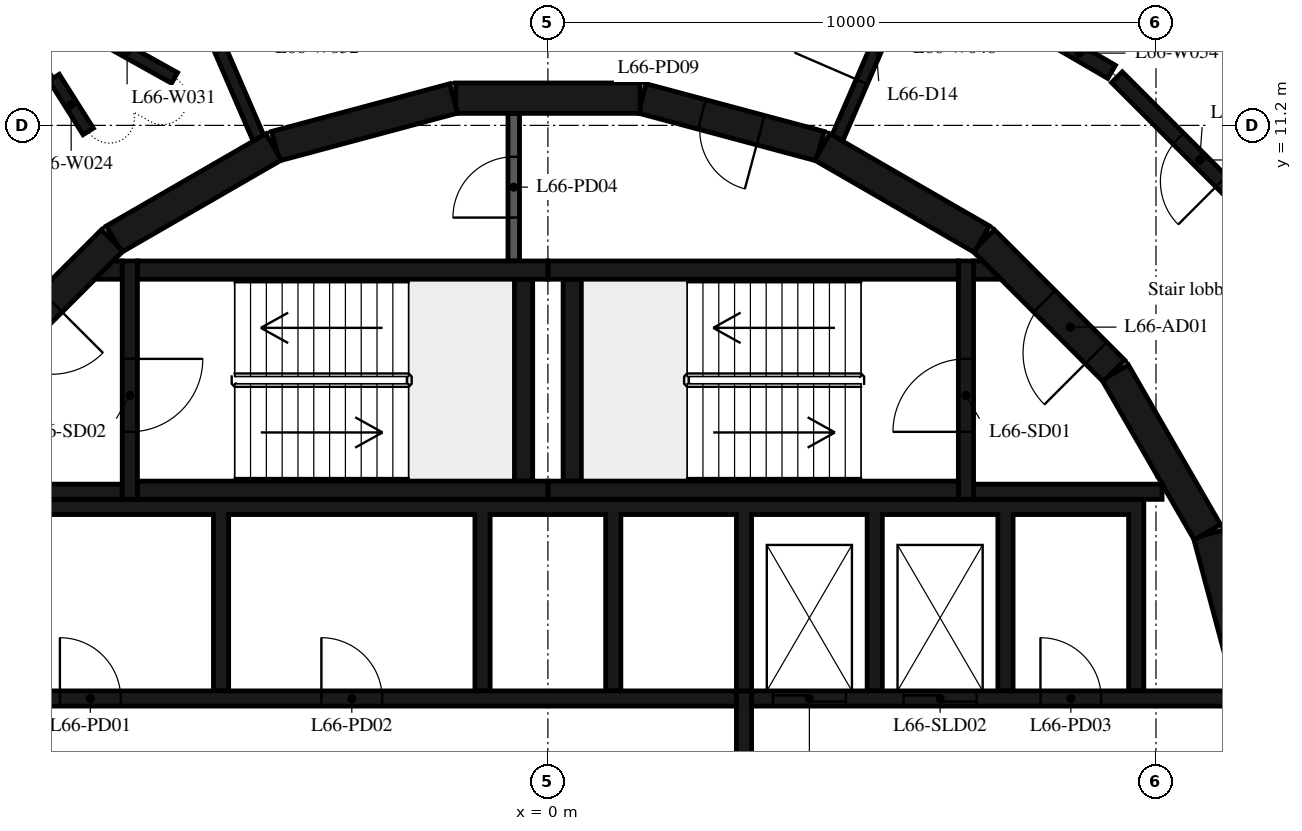
"""IFC4 building model, lengths in metres.
Left out: names, types, materials, properties, quantities, classifications, styles, units other than length and angle.
Written with IfcOpenShell. Run it as: python <this file> out.ifc"""

import sys

from ifc_helpers import new_model, si_unit, direction, frame, frame_2d, origin, place, context, subcontext, project, spatial, polyline, rectangle, outline, extrude, element, fill, save


model = new_model("IFC4")
c1 = context("Model", 3, precision=1e-05, world=origin(), true_north=direction((0.0, 1.0)))
c2 = subcontext(c1, "Body", "Model", "MODEL_VIEW")
j1 = project(units=[si_unit("LENGTHUNIT", "METRE"), si_unit("PLANEANGLEUNIT", "RADIAN")], contexts=[c1])
p1 = place(None, origin())
s1 = spatial("IfcSite", under=j1, at=p1, CompositionType="ELEMENT")
p2 = place(p1, origin())
s2 = spatial("IfcBuilding", under=s1, at=p2, CompositionType="ELEMENT")
p3 = place(p2, frame((0.0, 0.0, 258.2)))
s3 = spatial("IfcBuildingStorey", under=s2, at=p3, CompositionType="ELEMENT", Elevation=258.2)
for number, where, z_axis, x_axis in (
    (1, (11.643, 1.55, 0.0), (0.0, 0.0, 1.0), (-0.259, 0.966, 0.0)),
    (2, (10.845, 4.51, 0.0), (0.0, 0.0, 1.0), (-0.5, 0.866, 0.0)),
):
    element("IfcWall", number, at=place(p3, frame(where, z_axis=z_axis, x_axis=x_axis)), inside=s3, PredefinedType="SHEAR", context=c2, shape_type="SweptSolid", body=[
        extrude(rectangle(XDim=3.033, YDim=0.5, at=frame_2d((1.516, 0.0))), origin(), (0.0, 0.0, 1.0), 4.75),
    ])
p4 = place(p3, frame((9.308, 7.164, 0.0), z_axis=(0.0, 0.0, 1.0), x_axis=(-0.707106781187, 0.707106781187, 0.0)))
e3 = element("IfcWall", 3, at=p4, inside=s3, PredefinedType="SHEAR", context=c2, shape_type="SweptSolid", body=[
    extrude(rectangle(XDim=3.032, YDim=0.5, at=frame_2d((1.516, 0.0))), origin(), (0.0, 0.0, 1.0), 4.75),
])
p5 = place(p4, frame((0.416, 0.0, 0.0)))
e4 = element("IfcOpeningElement", 4, at=p5, cuts=e3, PredefinedType="OPENING", context=c2, shape_type="SweptSolid", body=[
    extrude(rectangle(XDim=1.2, YDim=2.1, at=frame_2d((0.6, 1.05))), frame((0.0, 0.26, 0.0), z_axis=(0.0, -1.0, 0.0), x_axis=(1.0, 0.0, 0.0)), (0.0, 0.0, 1.0), 0.52),
])
p6 = place(p3, frame((7.137, 9.329, 0.0), z_axis=(0.0, 0.0, 1.0), x_axis=(-0.865975092491, 0.500087131594, 0.0)))
e5 = element("IfcWall", 5, at=p6, inside=s3, PredefinedType="SHEAR", context=c2, shape_type="SweptSolid", body=[
    extrude(rectangle(XDim=3.033, YDim=0.5, at=frame_2d((1.516, 0.0))), origin(), (0.0, 0.0, 1.0), 4.75),
])
p7 = place(p3, frame((4.479, 10.858, 0.0), z_axis=(0.0, 0.0, 1.0), x_axis=(-0.965948410781, 0.258734743916, 0.0)))
e6 = element("IfcWall", 6, at=p7, inside=s3, PredefinedType="SHEAR", context=c2, shape_type="SweptSolid", body=[
    extrude(rectangle(XDim=3.033, YDim=0.5, at=frame_2d((1.516, 0.0))), origin(), (0.0, 0.0, 1.0), 4.75),
])
p8 = place(p7, frame((1.016, 0.0, 0.0)))
e7 = element("IfcOpeningElement", 7, at=p8, cuts=e6, PredefinedType="OPENING", context=c2, shape_type="SweptSolid", body=[
    extrude(rectangle(XDim=1.0, YDim=2.4, at=frame_2d((0.5, 1.2))), frame((0.0, 0.26, 0.0), z_axis=(0.0, -1.0, 0.0), x_axis=(1.0, 0.0, 0.0)), (0.0, 0.0, 1.0), 0.52),
])
for number, where, z_axis, x_axis in (
    (8, (1.516, 11.647, 0.0), (0.0, 0.0, 1.0), (-1.0, 0.0, 0.0)),
    (9, (-1.55, 11.643, 0.0), (0.0, 0.0, 1.0), (-0.966, -0.259, 0.0)),
    (10, (-4.51, 10.845, 0.0), (0.0, 0.0, 1.0), (-0.866, -0.5, 0.0)),
):
    element("IfcWall", number, at=place(p3, frame(where, z_axis=z_axis, x_axis=x_axis)), inside=s3, PredefinedType="SHEAR", context=c2, shape_type="SweptSolid", body=[
        extrude(rectangle(XDim=3.033, YDim=0.5, at=frame_2d((1.516, 0.0))), origin(), (0.0, 0.0, 1.0), 4.75),
    ])
p9 = place(p3, frame((-7.164, 9.308, 0.0), z_axis=(0.0, 0.0, 1.0), x_axis=(-0.707106781187, -0.707106781187, 0.0)))
e11 = element("IfcWall", 11, at=p9, inside=s3, PredefinedType="SHEAR", context=c2, shape_type="SweptSolid", body=[
    extrude(rectangle(XDim=3.032, YDim=0.5, at=frame_2d((1.516, 0.0))), origin(), (0.0, 0.0, 1.0), 4.75),
])
p10 = place(p9, frame((1.416, 0.0, 0.0)))
e12 = element("IfcOpeningElement", 12, at=p10, cuts=e11, PredefinedType="OPENING", context=c2, shape_type="SweptSolid", body=[
    extrude(rectangle(XDim=1.2, YDim=2.1, at=frame_2d((0.6, 1.05))), frame((0.0, 0.26, 0.0), z_axis=(0.0, -1.0, 0.0), x_axis=(1.0, 0.0, 0.0)), (0.0, 0.0, 1.0), 0.52),
])
for number, where, z_axis, x_axis in (
    (13, (0.0, 5.2, 0.0), (0.0, 0.0, 1.0), (1.0, 0.0, 0.0)),
    (14, (0.0, 8.82, 0.0), (0.0, 0.0, 1.0), (1.0, 0.0, 0.0)),
):
    element("IfcWall", number, at=place(p3, frame(where, z_axis=z_axis, x_axis=x_axis)), inside=s3, PredefinedType="SHEAR", context=c2, shape_type="SweptSolid", body=[
        extrude(rectangle(XDim=6.75, YDim=0.3, at=frame_2d((3.375, 0.0))), origin(), (0.0, 0.0, 1.0), 4.75),
    ])
p11 = place(p3, frame((0.4, 5.35, 0.0), z_axis=(0.0, 0.0, 1.0), x_axis=(0.0, 1.0, 0.0)))
e15 = element("IfcWall", 15, at=p11, inside=s3, PredefinedType="SHEAR", context=c2, shape_type="SweptSolid", body=[
    extrude(rectangle(XDim=3.32, YDim=0.3, at=frame_2d((1.66, 0.0))), origin(), (0.0, 0.0, 1.0), 4.75),
])
p12 = place(p3, frame((6.875, 5.05, 0.0), z_axis=(0.0, 0.0, 1.0), x_axis=(0.0, 1.0, 0.0)))
e16 = element("IfcWall", 16, at=p12, inside=s3, PredefinedType="SHEAR", context=c2, shape_type="SweptSolid", body=[
    extrude(rectangle(XDim=3.92, YDim=0.25, at=frame_2d((1.96, 0.0))), origin(), (0.0, 0.0, 1.0), 4.75),
])
p13 = place(p12, frame((1.11, 0.0, 0.0)))
e17 = element("IfcOpeningElement", 17, at=p13, cuts=e16, PredefinedType="OPENING", context=c2, shape_type="SweptSolid", body=[
    extrude(rectangle(XDim=1.2, YDim=2.1, at=frame_2d((0.6, 1.05))), frame((0.0, 0.135, 0.0), z_axis=(0.0, -1.0, 0.0), x_axis=(1.0, 0.0, 0.0)), (0.0, 0.0, 1.0), 0.27),
])
p14 = place(p3, frame((7.0, 5.175, 0.0), z_axis=(0.0, 0.0, 1.0), x_axis=(1.0, 0.0, 0.0)))
e18 = element("IfcWall", 18, at=p14, inside=s3, PredefinedType="SHEAR", context=c2, shape_type="SweptSolid", body=[
    extrude(rectangle(XDim=3.1, YDim=0.25, at=frame_2d((1.55, 0.0))), origin(), (0.0, 0.0, 1.0), 4.75),
])
p15 = place(p3, origin())
e19 = element("IfcWall", 19, at=p15, inside=s3, PredefinedType="SHEAR", context=c2, shape_type="SweptSolid", body=[
    extrude(outline(polyline([(7.448, 8.67), (7.0, 8.67), (7.0, 8.97), (7.148, 8.97), (7.448, 8.67)])), origin(), (0.0, 0.0, 1.0), 4.75),
])
for number, where, z_axis, x_axis in (
    (20, (-6.75, 5.2, 0.0), (0.0, 0.0, 1.0), (1.0, 0.0, 0.0)),
    (21, (-6.75, 8.82, 0.0), (0.0, 0.0, 1.0), (1.0, 0.0, 0.0)),
):
    element("IfcWall", number, at=place(p3, frame(where, z_axis=z_axis, x_axis=x_axis)), inside=s3, PredefinedType="SHEAR", context=c2, shape_type="SweptSolid", body=[
        extrude(rectangle(XDim=6.75, YDim=0.3, at=frame_2d((3.375, 0.0))), origin(), (0.0, 0.0, 1.0), 4.75),
    ])
p16 = place(p3, frame((-0.4, 5.35, 0.0), z_axis=(0.0, 0.0, 1.0), x_axis=(0.0, 1.0, 0.0)))
e22 = element("IfcWall", 22, at=p16, inside=s3, PredefinedType="SHEAR", context=c2, shape_type="SweptSolid", body=[
    extrude(rectangle(XDim=3.32, YDim=0.3, at=frame_2d((1.66, 0.0))), origin(), (0.0, 0.0, 1.0), 4.75),
])
p17 = place(p3, frame((-6.875, 8.97, 0.0), z_axis=(0.0, 0.0, 1.0), x_axis=(0.0, -1.0, 0.0)))
e23 = element("IfcWall", 23, at=p17, inside=s3, PredefinedType="SHEAR", context=c2, shape_type="SweptSolid", body=[
    extrude(rectangle(XDim=3.92, YDim=0.25, at=frame_2d((1.96, 0.0))), origin(), (0.0, 0.0, 1.0), 4.75),
])
p18 = place(p17, frame((1.61, 0.0, 0.0)))
e24 = element("IfcOpeningElement", 24, at=p18, cuts=e23, PredefinedType="OPENING", context=c2, shape_type="SweptSolid", body=[
    extrude(rectangle(XDim=1.2, YDim=2.1, at=frame_2d((0.6, 1.05))), frame((0.0, 0.135, 0.0), z_axis=(0.0, -1.0, 0.0), x_axis=(1.0, 0.0, 0.0)), (0.0, 0.0, 1.0), 0.27),
])
p19 = place(p3, frame((-7.0, 5.175, 0.0), z_axis=(0.0, 0.0, 1.0), x_axis=(-1.0, 0.0, 0.0)))
e25 = element("IfcWall", 25, at=p19, inside=s3, PredefinedType="SHEAR", context=c2, shape_type="SweptSolid", body=[
    extrude(rectangle(XDim=3.1, YDim=0.25, at=frame_2d((1.55, 0.0))), origin(), (0.0, 0.0, 1.0), 4.75),
])
p20 = place(p3, origin())
e26 = element("IfcWall", 26, at=p20, inside=s3, PredefinedType="SHEAR", context=c2, shape_type="SweptSolid", body=[
    extrude(outline(polyline([(-7.148, 8.97), (-7.0, 8.97), (-7.0, 8.67), (-7.448, 8.67), (-7.148, 8.97)])), origin(), (0.0, 0.0, 1.0), 4.75),
])
p21 = place(p3, origin())
e27 = element("IfcWall", 27, at=p21, inside=s3, PredefinedType="SHEAR", context=c2, shape_type="SweptSolid", body=[
    extrude(outline(polyline([(-9.55, 4.8), (-5.5, 4.8), (-5.5, 1.9), (-5.25, 1.9), (-5.25, 4.8), (-1.2, 4.8), (-1.2, 1.9), (-0.95, 1.9), (-0.95, 4.8), (0.95, 4.8), (0.95, 1.9), (1.2, 1.9), (1.2, 4.8), (3.1, 4.8), (3.1, 1.9), (3.35, 1.9), (3.35, 4.8), (5.25, 4.8), (5.25, 1.9), (5.5, 1.9), (5.5, 4.8), (7.4, 4.8), (7.4, 1.9), (7.65, 1.9), (7.65, 4.8), (9.55, 4.8), (9.55, 1.9), (9.8, 1.9), (9.8, 4.8), (9.8, 5.05), (-9.8, 5.05), (-9.8, 4.8), (-9.8, 1.9), (-9.55, 1.9), (-9.55, 4.8)])), origin(), (0.0, 0.0, 1.0), 4.75),
])
p22 = place(p3, frame((-11.28, 1.775, 0.0), z_axis=(0.0, 0.0, 1.0), x_axis=(1.0, 0.0, 0.0)))
e28 = element("IfcWall", 28, at=p22, inside=s3, PredefinedType="SHEAR", context=c2, shape_type="SweptSolid", body=[
    extrude(rectangle(XDim=14.38, YDim=0.25, at=frame_2d((7.19, 0.0))), origin(), (0.0, 0.0, 1.0), 4.75),
])
p23 = place(p22, frame((3.255, 0.0, 0.0)))
e29 = element("IfcOpeningElement", 29, at=p23, cuts=e28, PredefinedType="OPENING", context=c2, shape_type="SweptSolid", body=[
    extrude(rectangle(XDim=1.0, YDim=2.4, at=frame_2d((0.5, 1.2))), frame((0.0, 0.135, 0.0), z_axis=(0.0, -1.0, 0.0), x_axis=(1.0, 0.0, 0.0)), (0.0, 0.0, 1.0), 0.27),
])
p24 = place(p22, frame((7.555, 0.0, 0.0)))
e30 = element("IfcOpeningElement", 30, at=p24, cuts=e28, PredefinedType="OPENING", context=c2, shape_type="SweptSolid", body=[
    extrude(rectangle(XDim=1.0, YDim=2.4, at=frame_2d((0.5, 1.2))), frame((0.0, 0.135, 0.0), z_axis=(0.0, -1.0, 0.0), x_axis=(1.0, 0.0, 0.0)), (0.0, 0.0, 1.0), 0.27),
])
p25 = place(p3, frame((3.35, 1.775, 0.0), z_axis=(0.0, 0.0, 1.0), x_axis=(1.0, 0.0, 0.0)))
e31 = element("IfcWall", 31, at=p25, inside=s3, PredefinedType="SHEAR", context=c2, shape_type="SweptSolid", body=[
    extrude(rectangle(XDim=7.93, YDim=0.25, at=frame_2d((3.965, 0.0))), origin(), (0.0, 0.0, 1.0), 4.75),
])
p26 = place(p25, frame((0.35, 0.0, 0.0)))
e32 = element("IfcOpeningElement", 32, at=p26, cuts=e31, PredefinedType="OPENING", context=c2, shape_type="SweptSolid", body=[
    extrude(rectangle(XDim=1.2, YDim=2.4, at=frame_2d((0.6, 1.2))), frame((0.0, 0.135, 0.0), z_axis=(0.0, -1.0, 0.0), x_axis=(1.0, 0.0, 0.0)), (0.0, 0.0, 1.0), 0.27),
])
p27 = place(p25, frame((2.5, 0.0, 0.0)))
e33 = element("IfcOpeningElement", 33, at=p27, cuts=e31, PredefinedType="OPENING", context=c2, shape_type="SweptSolid", body=[
    extrude(rectangle(XDim=1.2, YDim=2.4, at=frame_2d((0.6, 1.2))), frame((0.0, 0.135, 0.0), z_axis=(0.0, -1.0, 0.0), x_axis=(1.0, 0.0, 0.0)), (0.0, 0.0, 1.0), 0.27),
])
p28 = place(p25, frame((4.75, 0.0, 0.0)))
e34 = element("IfcOpeningElement", 34, at=p28, cuts=e31, PredefinedType="OPENING", context=c2, shape_type="SweptSolid", body=[
    extrude(rectangle(XDim=1.0, YDim=2.4, at=frame_2d((0.5, 1.2))), frame((0.0, 0.135, 0.0), z_axis=(0.0, -1.0, 0.0), x_axis=(1.0, 0.0, 0.0)), (0.0, 0.0, 1.0), 0.27),
])
p29 = place(p3, frame((3.225, -1.9, 0.0), z_axis=(0.0, 0.0, 1.0), x_axis=(0.0, 1.0, 0.0)))
e35 = element("IfcWall", 35, at=p29, inside=s3, PredefinedType="SHEAR", context=c2, shape_type="SweptSolid", body=[
    extrude(rectangle(XDim=3.8, YDim=0.25, at=frame_2d((1.9, 0.0))), origin(), (0.0, 0.0, 1.0), 4.75),
])
p30 = place(p3, frame((-0.562, 8.97, 0.0), z_axis=(0.0, 0.0, 1.0), x_axis=(0.0, 1.0, 0.0)))
e36 = element("IfcWall", 36, at=p30, inside=s3, PredefinedType="PARTITIONING", context=c2, shape_type="SweptSolid", body=[
    extrude(rectangle(XDim=2.427, YDim=0.19, at=frame_2d((1.214, 0.0))), origin(), (0.0, 0.0, 1.0), 4.75),
])
p31 = place(p30, frame((0.714, 0.0, 0.0)))
e37 = element("IfcOpeningElement", 37, at=p31, cuts=e36, PredefinedType="OPENING", context=c2, shape_type="SweptSolid", body=[
    extrude(rectangle(XDim=1.0, YDim=2.4, at=frame_2d((0.5, 1.2))), frame((0.0, 0.105, 0.0), z_axis=(0.0, -1.0, 0.0), x_axis=(1.0, 0.0, 0.0)), (0.0, 0.0, 1.0), 0.21),
])
p32 = place(p3, frame((-8.12, 11.986, 0.0), z_axis=(0.0, 0.0, 1.0), x_axis=(0.534054329683, -0.845450159943, 0.0)))
e38 = element("IfcWall", 38, at=p32, inside=s3, PredefinedType="PARTITIONING", context=c2, shape_type="SweptSolid", body=[
    extrude(rectangle(XDim=1.048, YDim=0.2, at=frame_2d((0.524, 0.0))), origin(), (0.0, 0.0, 1.0), 4.75),
])
p33 = place(p3, frame((-6.14, 11.98, 0.0), z_axis=(0.0, 0.0, 1.0), x_axis=(-0.873343748456, 0.487104400547, 0.0)))
e39 = element("IfcWall", 39, at=p33, inside=s3, PredefinedType="PARTITIONING", context=c2, shape_type="SweptSolid", body=[
    extrude(rectangle(XDim=1.786, YDim=0.2, at=frame_2d((0.893, 0.0))), origin(), (0.0, 0.0, 1.0), 4.75),
])
p34 = place(p3, frame((-6.039, 13.948, 0.0), z_axis=(0.0, 0.0, 1.0), x_axis=(0.396897353622, -0.917863002135, 0.0)))
e40 = element("IfcWall", 40, at=p34, inside=s3, PredefinedType="PARTITIONING", context=c2, shape_type="SweptSolid", body=[
    extrude(rectangle(XDim=3.223, YDim=0.2, at=frame_2d((1.612, 0.0))), origin(), (0.0, 0.0, 1.0), 4.75),
])
p35 = place(p34, frame((0.312, 0.0, 0.0)))
e41 = element("IfcOpeningElement", 41, at=p35, cuts=e40, PredefinedType="OPENING", context=c2, shape_type="SweptSolid", body=[
    extrude(rectangle(XDim=1.2, YDim=2.1, at=frame_2d((0.6, 1.05))), frame((0.0, 0.11, 0.0), z_axis=(0.0, -1.0, 0.0), x_axis=(1.0, 0.0, 0.0)), (0.0, 0.0, 1.0), 0.22),
])
p36 = place(p3, frame((4.76, 10.99, 0.0), z_axis=(0.0, 0.0, 1.0), x_axis=(0.396905977672, 0.917859272922, 0.0)))
e42 = element("IfcWall", 42, at=p36, inside=s3, PredefinedType="PARTITIONING", context=c2, shape_type="SweptSolid", body=[
    extrude(rectangle(XDim=3.224, YDim=0.2, at=frame_2d((1.612, 0.0))), origin(), (0.0, 0.0, 1.0), 4.75),
])
p37 = place(p36, frame((1.012, 0.0, 0.0)))
e43 = element("IfcOpeningElement", 43, at=p37, cuts=e42, PredefinedType="OPENING", context=c2, shape_type="SweptSolid", body=[
    extrude(rectangle(XDim=1.2, YDim=2.1, at=frame_2d((0.6, 1.05))), frame((0.0, 0.11, 0.0), z_axis=(0.0, -1.0, 0.0), x_axis=(1.0, 0.0, 0.0)), (0.0, 0.0, 1.0), 0.22),
])
p38 = place(p3, frame((9.27, 12.08, 0.0), z_axis=(0.0, 0.0, 1.0), x_axis=(-0.864599561852, 0.502461538474, 0.0)))
e44 = element("IfcWall", 44, at=p38, inside=s3, PredefinedType="PARTITIONING", context=c2, shape_type="SweptSolid", body=[
    extrude(rectangle(XDim=1.228, YDim=0.25, at=frame_2d((0.614, 0.0))), origin(), (0.0, 0.0, 1.0), 4.75),
])
p39 = place(p3, frame((12.08, 9.27, 0.0), z_axis=(0.0, 0.0, 1.0), x_axis=(-0.707106781187, 0.707106781187, 0.0)))
e45 = element("IfcWall", 45, at=p39, inside=s3, PredefinedType="PARTITIONING", context=c2, shape_type="SweptSolid", body=[
    extrude(rectangle(XDim=3.849, YDim=0.25, at=frame_2d((1.925, 0.0))), origin(), (0.0, 0.0, 1.0), 4.75),
])
p40 = place(p39, frame((1.425, 0.0, 0.0)))
e46 = element("IfcOpeningElement", 46, at=p40, cuts=e45, PredefinedType="OPENING", context=c2, shape_type="SweptSolid", body=[
    extrude(rectangle(XDim=1.0, YDim=2.1, at=frame_2d((0.5, 1.05))), frame((0.0, 0.135, 0.0), z_axis=(0.0, -1.0, 0.0), x_axis=(1.0, 0.0, 0.0)), (0.0, 0.0, 1.0), 0.27),
])
p41 = place(p3, frame((-8.192, 12.059, 0.0), z_axis=(0.0, 0.0, 1.0), x_axis=(-0.845540263532, -0.533911661932, 0.0)))
e47 = element("IfcWall", 47, at=p41, inside=s3, PredefinedType="PARTITIONING", context=c2, shape_type="SweptSolid", body=[
    extrude(rectangle(XDim=0.678, YDim=0.2, at=frame_2d((0.339, 0.0))), origin(), (0.0, 0.0, 1.0), 4.75),
])
p42 = place(p13, origin())
e48 = element("IfcDoor", 48, at=p42, inside=s3, OperationType="SINGLE_SWING_LEFT", PredefinedType="DOOR", context=c2, shape_type="SweptSolid", body=[
    extrude(rectangle(XDim=1.2, YDim=2.1, at=frame_2d((0.6, 1.05))), frame((0.0, 0.025, 0.0), z_axis=(0.0, -1.0, 0.0), x_axis=(1.0, 0.0, 0.0)), (0.0, 0.0, 1.0), 0.05),
])
fill(e17, e48)
p43 = place(p5, origin())
e49 = element("IfcDoor", 49, at=p43, inside=s3, OperationType="SINGLE_SWING_RIGHT", PredefinedType="DOOR", context=c2, shape_type="SweptSolid", body=[
    extrude(rectangle(XDim=1.2, YDim=2.1, at=frame_2d((0.6, 1.05))), frame((0.0, 0.025, 0.0), z_axis=(0.0, -1.0, 0.0), x_axis=(1.0, 0.0, 0.0)), (0.0, 0.0, 1.0), 0.05),
])
fill(e4, e49)
p44 = place(p18, origin())
e50 = element("IfcDoor", 50, at=p44, inside=s3, OperationType="SINGLE_SWING_LEFT", PredefinedType="DOOR", context=c2, shape_type="SweptSolid", body=[
    extrude(rectangle(XDim=1.2, YDim=2.1, at=frame_2d((0.6, 1.05))), frame((0.0, 0.025, 0.0), z_axis=(0.0, -1.0, 0.0), x_axis=(1.0, 0.0, 0.0)), (0.0, 0.0, 1.0), 0.05),
])
fill(e24, e50)
p45 = place(p10, origin())
e51 = element("IfcDoor", 51, at=p45, inside=s3, OperationType="SINGLE_SWING_RIGHT", PredefinedType="DOOR", context=c2, shape_type="SweptSolid", body=[
    extrude(rectangle(XDim=1.2, YDim=2.1, at=frame_2d((0.6, 1.05))), frame((0.0, 0.025, 0.0), z_axis=(0.0, -1.0, 0.0), x_axis=(1.0, 0.0, 0.0)), (0.0, 0.0, 1.0), 0.05),
])
fill(e12, e51)
p46 = place(p26, origin())
e52 = element("IfcDoor", 52, at=p46, inside=s3, OperationType="DOUBLE_DOOR_SLIDING", PredefinedType="DOOR", context=c2, shape_type="SweptSolid", body=[
    extrude(rectangle(XDim=1.2, YDim=2.4, at=frame_2d((0.6, 1.2))), frame((0.0, 0.025, 0.0), z_axis=(0.0, -1.0, 0.0), x_axis=(1.0, 0.0, 0.0)), (0.0, 0.0, 1.0), 0.05),
])
fill(e32, e52)
p47 = place(p27, origin())
e53 = element("IfcDoor", 53, at=p47, inside=s3, OperationType="DOUBLE_DOOR_SLIDING", PredefinedType="DOOR", context=c2, shape_type="SweptSolid", body=[
    extrude(rectangle(XDim=1.2, YDim=2.4, at=frame_2d((0.6, 1.2))), frame((0.0, 0.025, 0.0), z_axis=(0.0, -1.0, 0.0), x_axis=(1.0, 0.0, 0.0)), (0.0, 0.0, 1.0), 0.05),
])
fill(e33, e53)
p48 = place(p23, origin())
e54 = element("IfcDoor", 54, at=p48, inside=s3, OperationType="SINGLE_SWING_RIGHT", PredefinedType="DOOR", context=c2, shape_type="SweptSolid", body=[
    extrude(rectangle(XDim=1.0, YDim=2.4, at=frame_2d((0.5, 1.2))), frame((0.0, 0.025, 0.0), z_axis=(0.0, -1.0, 0.0), x_axis=(1.0, 0.0, 0.0)), (0.0, 0.0, 1.0), 0.05),
])
fill(e29, e54)
p49 = place(p24, origin())
e55 = element("IfcDoor", 55, at=p49, inside=s3, OperationType="SINGLE_SWING_LEFT", PredefinedType="DOOR", context=c2, shape_type="SweptSolid", body=[
    extrude(rectangle(XDim=1.0, YDim=2.4, at=frame_2d((0.5, 1.2))), frame((0.0, 0.025, 0.0), z_axis=(0.0, -1.0, 0.0), x_axis=(1.0, 0.0, 0.0)), (0.0, 0.0, 1.0), 0.05),
])
fill(e30, e55)
p50 = place(p28, origin())
e56 = element("IfcDoor", 56, at=p50, inside=s3, OperationType="SINGLE_SWING_RIGHT", PredefinedType="DOOR", context=c2, shape_type="SweptSolid", body=[
    extrude(rectangle(XDim=1.0, YDim=2.4, at=frame_2d((0.5, 1.2))), frame((0.0, 0.025, 0.0), z_axis=(0.0, -1.0, 0.0), x_axis=(1.0, 0.0, 0.0)), (0.0, 0.0, 1.0), 0.05),
])
fill(e34, e56)
p51 = place(p31, origin())
e57 = element("IfcDoor", 57, at=p51, inside=s3, OperationType="SINGLE_SWING_RIGHT", PredefinedType="DOOR", context=c2, shape_type="SweptSolid", body=[
    extrude(rectangle(XDim=1.0, YDim=2.4, at=frame_2d((0.5, 1.2))), frame((0.0, 0.025, 0.0), z_axis=(0.0, -1.0, 0.0), x_axis=(1.0, 0.0, 0.0)), (0.0, 0.0, 1.0), 0.05),
])
fill(e37, e57)
p52 = place(p8, origin())
e58 = element("IfcDoor", 58, at=p52, inside=s3, OperationType="SINGLE_SWING_LEFT", PredefinedType="DOOR", context=c2, shape_type="SweptSolid", body=[
    extrude(rectangle(XDim=1.0, YDim=2.4, at=frame_2d((0.5, 1.2))), frame((0.0, 0.025, 0.0), z_axis=(0.0, -1.0, 0.0), x_axis=(1.0, 0.0, 0.0)), (0.0, 0.0, 1.0), 0.05),
])
fill(e7, e58)
p53 = place(p40, origin())
e59 = element("IfcDoor", 59, at=p53, inside=s3, OperationType="SINGLE_SWING_LEFT", PredefinedType="DOOR", context=c2, shape_type="SweptSolid", body=[
    extrude(rectangle(XDim=1.0, YDim=2.1, at=frame_2d((0.5, 1.05))), frame((0.0, 0.025, 0.0), z_axis=(0.0, -1.0, 0.0), x_axis=(1.0, 0.0, 0.0)), (0.0, 0.0, 1.0), 0.05),
])
fill(e46, e59)
p54 = place(p37, origin())
e60 = element("IfcDoor", 60, at=p54, inside=s3, OperationType="SINGLE_SWING_LEFT", PredefinedType="DOOR", context=c2, shape_type="SweptSolid", body=[
    extrude(rectangle(XDim=1.2, YDim=2.1, at=frame_2d((0.6, 1.05))), frame((0.0, 0.025, 0.0), z_axis=(0.0, -1.0, 0.0), x_axis=(1.0, 0.0, 0.0)), (0.0, 0.0, 1.0), 0.05),
])
fill(e43, e60)
save(model, sys.argv[1])
